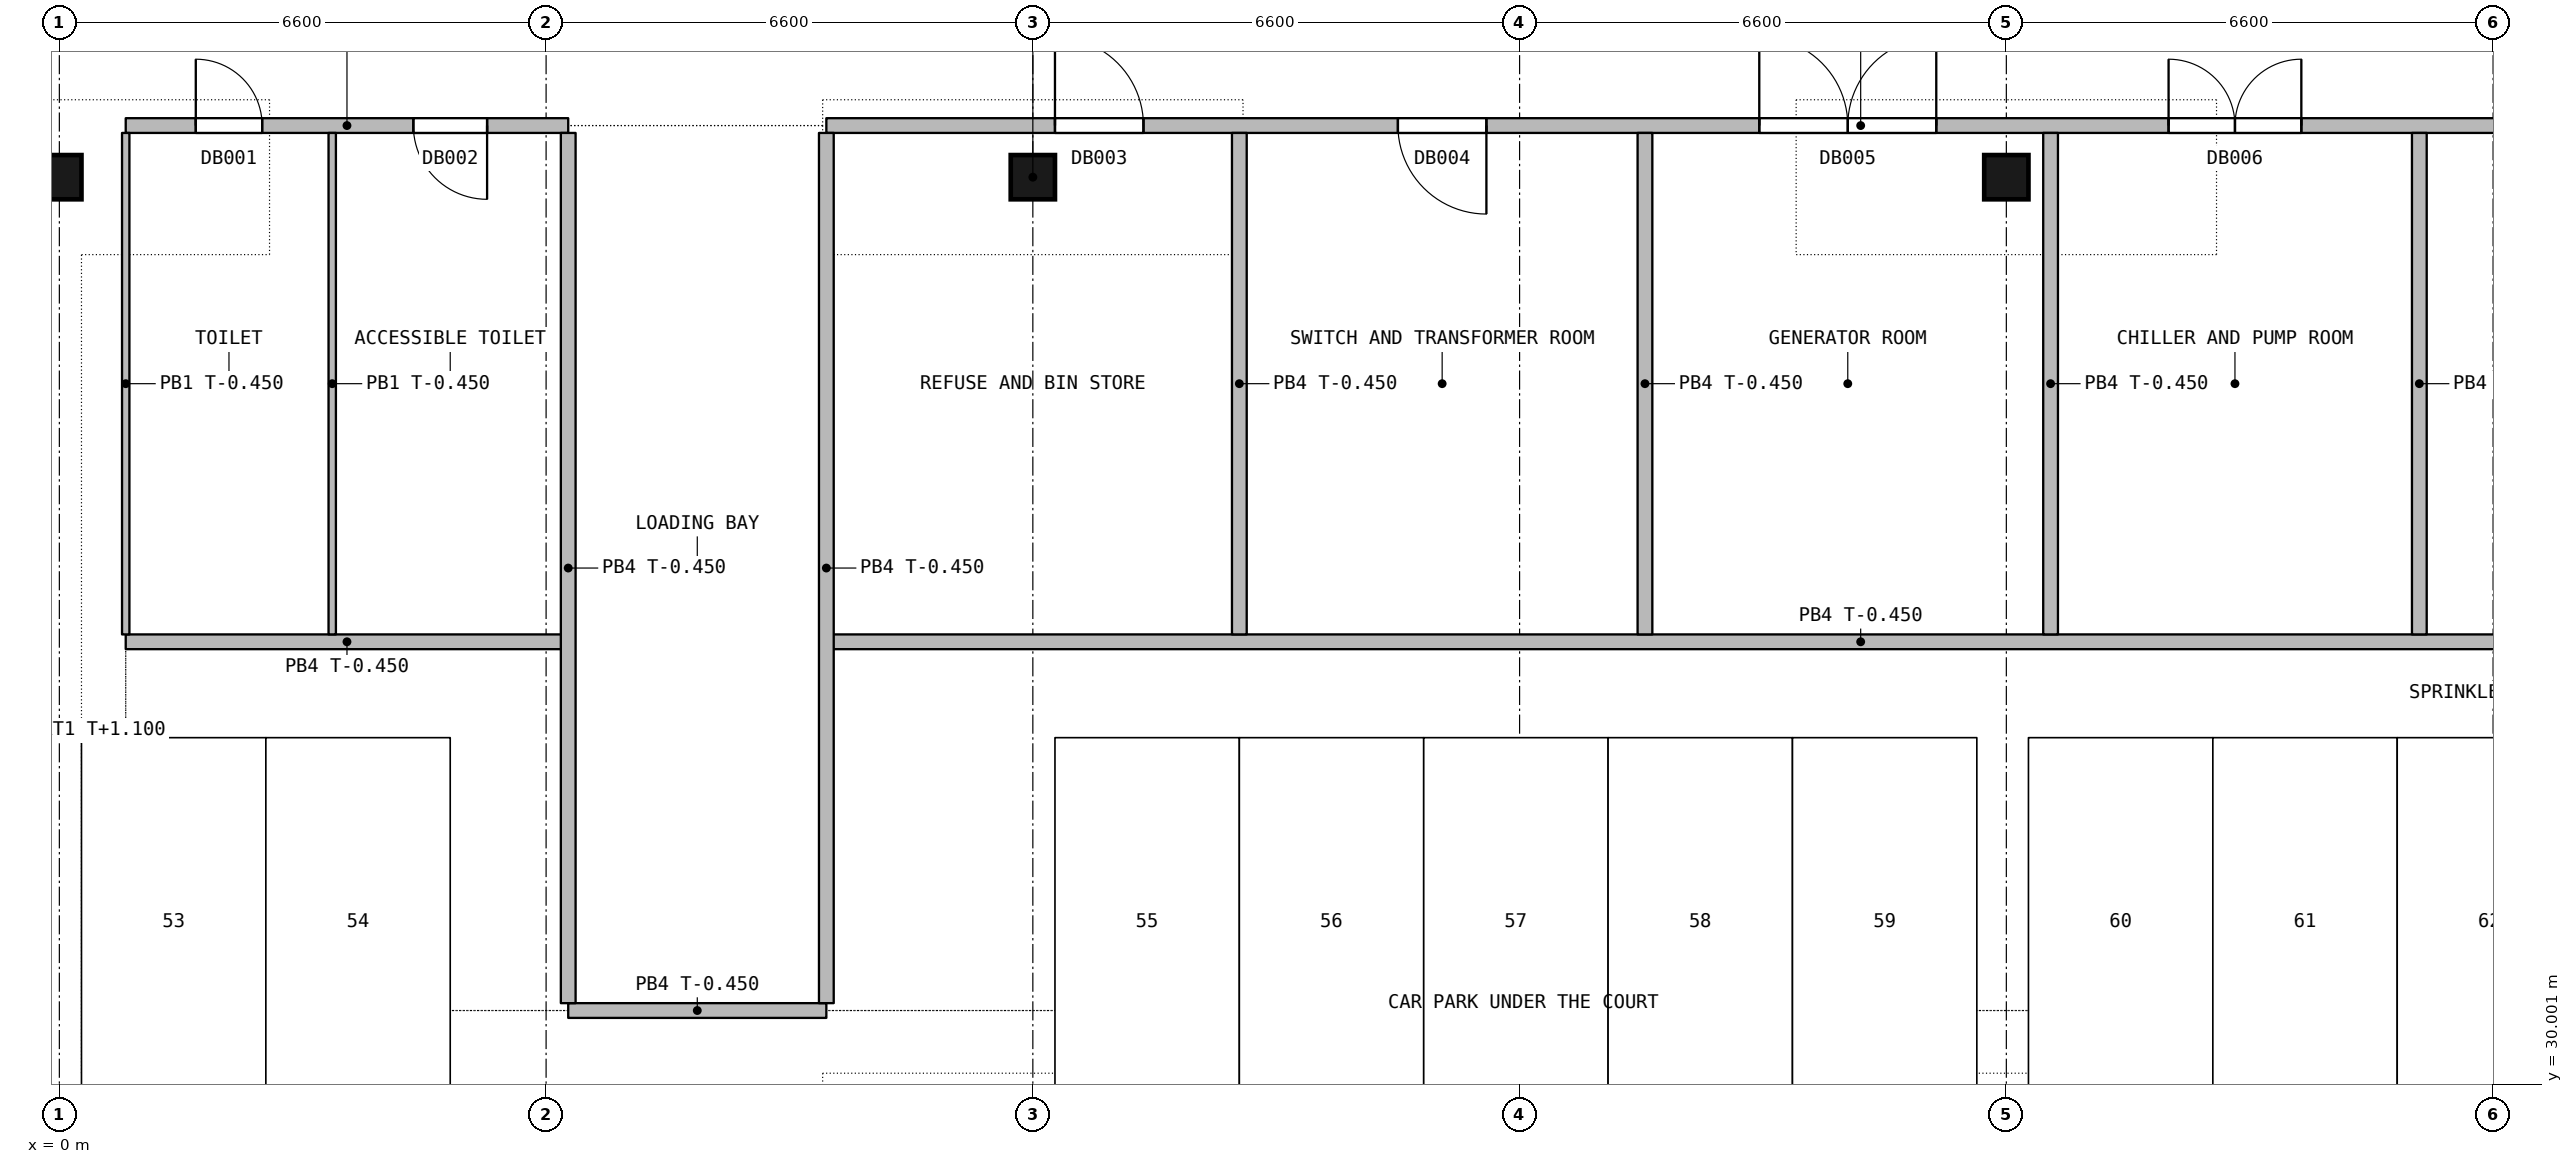
"""IFC4 building model, lengths in metres.
Left out: names, types, materials, properties, quantities, classifications, styles, units other than length and angle.
Written with IfcOpenShell. Run it as: python <this file> out.ifc"""

import sys

from ifc_helpers import new_model, si_unit, direction, frame, frame_2d, origin, origin_2d, place, context, subcontext, project, spatial, rectangle, extrude, element, fill, save


model = new_model("IFC4")
c1 = context("Model", 3, precision=1e-05, world=origin(), true_north=direction((0.0, 1.0)))
c2 = subcontext(c1, "Body", "Model", "MODEL_VIEW")
j1 = project(units=[si_unit("LENGTHUNIT", "METRE"), si_unit("PLANEANGLEUNIT", "RADIAN")], contexts=[c1])
p1 = place(None, origin())
s1 = spatial("IfcSite", under=j1, at=p1, CompositionType="ELEMENT")
p2 = place(p1, origin())
s2 = spatial("IfcBuilding", under=s1, at=p2, CompositionType="ELEMENT")
p3 = place(p2, frame((0.0, 0.0, -5.7)))
s3 = spatial("IfcBuildingStorey", under=s2, at=p3, CompositionType="ELEMENT", Elevation=-5.7)
for number, where, z_axis, x_axis in (
    (1, (0.0, 42.3, 0.0), (0.0, 0.0, 1.0), (1.0, 0.0, 0.0)),
    (2, (13.2, 42.3, 0.0), (0.0, 0.0, 1.0), (1.0, 0.0, 0.0)),
    (3, (26.4, 42.3, 0.0), (0.0, 0.0, 1.0), (1.0, 0.0, 0.0)),
):
    element("IfcColumn", number, at=place(p3, frame(where, z_axis=z_axis, x_axis=x_axis)), inside=s3, PredefinedType="COLUMN", context=c2, shape_type="SweptSolid", body=[
        extrude(rectangle(XDim=0.6, YDim=0.6, at=origin_2d()), origin(), (0.0, 0.0, 1.0), 5.2),
    ])
p4 = place(p3, frame((6.9, 31.0, 0.0), z_axis=(0.0, 0.0, 1.0), x_axis=(1.0, 0.0, 0.0)))
e4 = element("IfcWall", 4, at=p4, inside=s3, PredefinedType="PARTITIONING", context=c2, shape_type="SweptSolid", body=[
    extrude(rectangle(XDim=3.5, YDim=0.2, at=frame_2d((1.75, 0.0))), origin(), (0.0, 0.0, 1.0), 5.25),
])
p5 = place(p3, frame((0.9, 36.0, 0.0), z_axis=(0.0, 0.0, 1.0), x_axis=(1.0, 0.0, 0.0)))
e5 = element("IfcWall", 5, at=p5, inside=s3, PredefinedType="PARTITIONING", context=c2, shape_type="SweptSolid", body=[
    extrude(rectangle(XDim=6.0, YDim=0.2, at=frame_2d((3.0, 0.0))), origin(), (0.0, 0.0, 1.0), 5.25),
])
p6 = place(p3, frame((10.4, 36.0, 0.0), z_axis=(0.0, 0.0, 1.0), x_axis=(1.0, 0.0, 0.0)))
e6 = element("IfcWall", 6, at=p6, inside=s3, PredefinedType="PARTITIONING", context=c2, shape_type="SweptSolid", body=[
    extrude(rectangle(XDim=28.5, YDim=0.2, at=frame_2d((14.25, 0.0))), origin(), (0.0, 0.0, 1.0), 5.25),
])
p7 = place(p3, frame((0.9, 43.0, 0.0), z_axis=(0.0, 0.0, 1.0), x_axis=(1.0, 0.0, 0.0)))
e7 = element("IfcWall", 7, at=p7, inside=s3, PredefinedType="PARTITIONING", context=c2, shape_type="SweptSolid", body=[
    extrude(rectangle(XDim=6.0, YDim=0.2, at=frame_2d((3.0, 0.0))), origin(), (0.0, 0.0, 1.0), 5.25),
])
p8 = place(p7, frame((0.95, 0.0, 0.0)))
e8 = element("IfcOpeningElement", 8, at=p8, cuts=e7, PredefinedType="OPENING", context=c2, shape_type="SweptSolid", body=[
    extrude(rectangle(XDim=0.9, YDim=2.1, at=frame_2d((0.45, 1.05))), frame((0.0, 0.11, 0.0), z_axis=(0.0, -1.0, 0.0), x_axis=(1.0, 0.0, 0.0)), (0.0, 0.0, 1.0), 0.22),
])
p9 = place(p7, frame((3.9, 0.0, 0.0)))
e9 = element("IfcOpeningElement", 9, at=p9, cuts=e7, PredefinedType="OPENING", context=c2, shape_type="SweptSolid", body=[
    extrude(rectangle(XDim=1.0, YDim=2.1, at=frame_2d((0.5, 1.05))), frame((0.0, 0.11, 0.0), z_axis=(0.0, -1.0, 0.0), x_axis=(1.0, 0.0, 0.0)), (0.0, 0.0, 1.0), 0.22),
])
p10 = place(p3, frame((10.4, 43.0, 0.0), z_axis=(0.0, 0.0, 1.0), x_axis=(1.0, 0.0, 0.0)))
e10 = element("IfcWall", 10, at=p10, inside=s3, PredefinedType="PARTITIONING", context=c2, shape_type="SweptSolid", body=[
    extrude(rectangle(XDim=28.5, YDim=0.2, at=frame_2d((14.25, 0.0))), origin(), (0.0, 0.0, 1.0), 5.25),
])
p11 = place(p10, frame((3.1, 0.0, 0.0)))
e11 = element("IfcOpeningElement", 11, at=p11, cuts=e10, PredefinedType="OPENING", context=c2, shape_type="SweptSolid", body=[
    extrude(rectangle(XDim=1.2, YDim=2.1, at=frame_2d((0.6, 1.05))), frame((0.0, 0.11, 0.0), z_axis=(0.0, -1.0, 0.0), x_axis=(1.0, 0.0, 0.0)), (0.0, 0.0, 1.0), 0.22),
])
p12 = place(p10, frame((7.75, 0.0, 0.0)))
e12 = element("IfcOpeningElement", 12, at=p12, cuts=e10, PredefinedType="OPENING", context=c2, shape_type="SweptSolid", body=[
    extrude(rectangle(XDim=1.2, YDim=2.1, at=frame_2d((0.6, 1.05))), frame((0.0, 0.11, 0.0), z_axis=(0.0, -1.0, 0.0), x_axis=(1.0, 0.0, 0.0)), (0.0, 0.0, 1.0), 0.22),
])
p13 = place(p10, frame((12.65, 0.0, 0.0)))
e13 = element("IfcOpeningElement", 13, at=p13, cuts=e10, PredefinedType="OPENING", context=c2, shape_type="SweptSolid", body=[
    extrude(rectangle(XDim=2.4, YDim=2.4, at=frame_2d((1.2, 1.2))), frame((0.0, 0.11, 0.0), z_axis=(0.0, -1.0, 0.0), x_axis=(1.0, 0.0, 0.0)), (0.0, 0.0, 1.0), 0.22),
])
p14 = place(p10, frame((18.2, 0.0, 0.0)))
e14 = element("IfcOpeningElement", 14, at=p14, cuts=e10, PredefinedType="OPENING", context=c2, shape_type="SweptSolid", body=[
    extrude(rectangle(XDim=1.8, YDim=2.4, at=frame_2d((0.9, 1.2))), frame((0.0, 0.11, 0.0), z_axis=(0.0, -1.0, 0.0), x_axis=(1.0, 0.0, 0.0)), (0.0, 0.0, 1.0), 0.22),
])
p15 = place(p10, frame((23.1, 0.0, 0.0)))
e15 = element("IfcOpeningElement", 15, at=p15, cuts=e10, PredefinedType="OPENING", context=c2, shape_type="SweptSolid", body=[
    extrude(rectangle(XDim=1.0, YDim=2.1, at=frame_2d((0.5, 1.05))), frame((0.0, 0.11, 0.0), z_axis=(0.0, -1.0, 0.0), x_axis=(1.0, 0.0, 0.0)), (0.0, 0.0, 1.0), 0.22),
])
p16 = place(p10, frame((26.55, 0.0, 0.0)))
e16 = element("IfcOpeningElement", 16, at=p16, cuts=e10, PredefinedType="OPENING", context=c2, shape_type="SweptSolid", body=[
    extrude(rectangle(XDim=1.0, YDim=2.1, at=frame_2d((0.5, 1.05))), frame((0.0, 0.11, 0.0), z_axis=(0.0, -1.0, 0.0), x_axis=(1.0, 0.0, 0.0)), (0.0, 0.0, 1.0), 0.22),
])
for number, where, z_axis, x_axis in (
    (17, (0.9, 36.1, 0.0), (0.0, 0.0, 1.0), (0.0, 1.0, 0.0)),
    (18, (3.7, 36.1, 0.0), (0.0, 0.0, 1.0), (0.0, 1.0, 0.0)),
):
    element("IfcWall", number, at=place(p3, frame(where, z_axis=z_axis, x_axis=x_axis)), inside=s3, PredefinedType="PARTITIONING", context=c2, shape_type="SweptSolid", body=[
        extrude(rectangle(XDim=6.8, YDim=0.1, at=frame_2d((3.4, 0.0))), origin(), (0.0, 0.0, 1.0), 5.25),
    ])
for number, where, z_axis, x_axis in (
    (19, (6.9, 31.1, 0.0), (0.0, 0.0, 1.0), (0.0, 1.0, 0.0)),
    (20, (10.4, 31.1, 0.0), (0.0, 0.0, 1.0), (0.0, 1.0, 0.0)),
):
    element("IfcWall", number, at=place(p3, frame(where, z_axis=z_axis, x_axis=x_axis)), inside=s3, PredefinedType="PARTITIONING", context=c2, shape_type="SweptSolid", body=[
        extrude(rectangle(XDim=11.8, YDim=0.2, at=frame_2d((5.9, 0.0))), origin(), (0.0, 0.0, 1.0), 5.25),
    ])
for number, where, z_axis, x_axis in (
    (21, (16.0, 36.1, 0.0), (0.0, 0.0, 1.0), (0.0, 1.0, 0.0)),
    (22, (21.5, 36.1, 0.0), (0.0, 0.0, 1.0), (0.0, 1.0, 0.0)),
    (23, (27.0, 36.1, 0.0), (0.0, 0.0, 1.0), (0.0, 1.0, 0.0)),
    (24, (32.0, 36.1, 0.0), (0.0, 0.0, 1.0), (0.0, 1.0, 0.0)),
):
    element("IfcWall", number, at=place(p3, frame(where, z_axis=z_axis, x_axis=x_axis)), inside=s3, PredefinedType="PARTITIONING", context=c2, shape_type="SweptSolid", body=[
        extrude(rectangle(XDim=6.8, YDim=0.2, at=frame_2d((3.4, 0.0))), origin(), (0.0, 0.0, 1.0), 5.25),
    ])
p17 = place(p8, origin())
e25 = element("IfcDoor", 25, at=p17, inside=s3, OperationType="SINGLE_SWING_LEFT", PredefinedType="DOOR", context=c2, shape_type="SweptSolid", body=[
    extrude(rectangle(XDim=0.9, YDim=2.1, at=frame_2d((0.45, 1.05))), frame((0.0, 0.025, 0.0), z_axis=(0.0, -1.0, 0.0), x_axis=(1.0, 0.0, 0.0)), (0.0, 0.0, 1.0), 0.05),
])
fill(e8, e25)
p18 = place(p9, origin())
e26 = element("IfcDoor", 26, at=p18, inside=s3, OperationType="SINGLE_SWING_RIGHT", PredefinedType="DOOR", context=c2, shape_type="SweptSolid", body=[
    extrude(rectangle(XDim=1.0, YDim=2.1, at=frame_2d((0.5, 1.05))), frame((0.0, 0.025, 0.0), z_axis=(0.0, -1.0, 0.0), x_axis=(1.0, 0.0, 0.0)), (0.0, 0.0, 1.0), 0.05),
])
fill(e9, e26)
p19 = place(p11, origin())
e27 = element("IfcDoor", 27, at=p19, inside=s3, OperationType="SINGLE_SWING_LEFT", PredefinedType="DOOR", context=c2, shape_type="SweptSolid", body=[
    extrude(rectangle(XDim=1.2, YDim=2.1, at=frame_2d((0.6, 1.05))), frame((0.0, 0.025, 0.0), z_axis=(0.0, -1.0, 0.0), x_axis=(1.0, 0.0, 0.0)), (0.0, 0.0, 1.0), 0.05),
])
fill(e11, e27)
p20 = place(p12, origin())
e28 = element("IfcDoor", 28, at=p20, inside=s3, OperationType="SINGLE_SWING_RIGHT", PredefinedType="DOOR", context=c2, shape_type="SweptSolid", body=[
    extrude(rectangle(XDim=1.2, YDim=2.1, at=frame_2d((0.6, 1.05))), frame((0.0, 0.025, 0.0), z_axis=(0.0, -1.0, 0.0), x_axis=(1.0, 0.0, 0.0)), (0.0, 0.0, 1.0), 0.05),
])
fill(e12, e28)
p21 = place(p13, origin())
e29 = element("IfcDoor", 29, at=p21, inside=s3, OperationType="DOUBLE_DOOR_SINGLE_SWING", PredefinedType="DOOR", context=c2, shape_type="SweptSolid", body=[
    extrude(rectangle(XDim=2.4, YDim=2.4, at=frame_2d((1.2, 1.2))), frame((0.0, 0.025, 0.0), z_axis=(0.0, -1.0, 0.0), x_axis=(1.0, 0.0, 0.0)), (0.0, 0.0, 1.0), 0.05),
])
fill(e13, e29)
p22 = place(p14, origin())
e30 = element("IfcDoor", 30, at=p22, inside=s3, OperationType="DOUBLE_DOOR_SINGLE_SWING", PredefinedType="DOOR", context=c2, shape_type="SweptSolid", body=[
    extrude(rectangle(XDim=1.8, YDim=2.4, at=frame_2d((0.9, 1.2))), frame((0.0, 0.025, 0.0), z_axis=(0.0, -1.0, 0.0), x_axis=(1.0, 0.0, 0.0)), (0.0, 0.0, 1.0), 0.05),
])
fill(e14, e30)
save(model, sys.argv[1])
